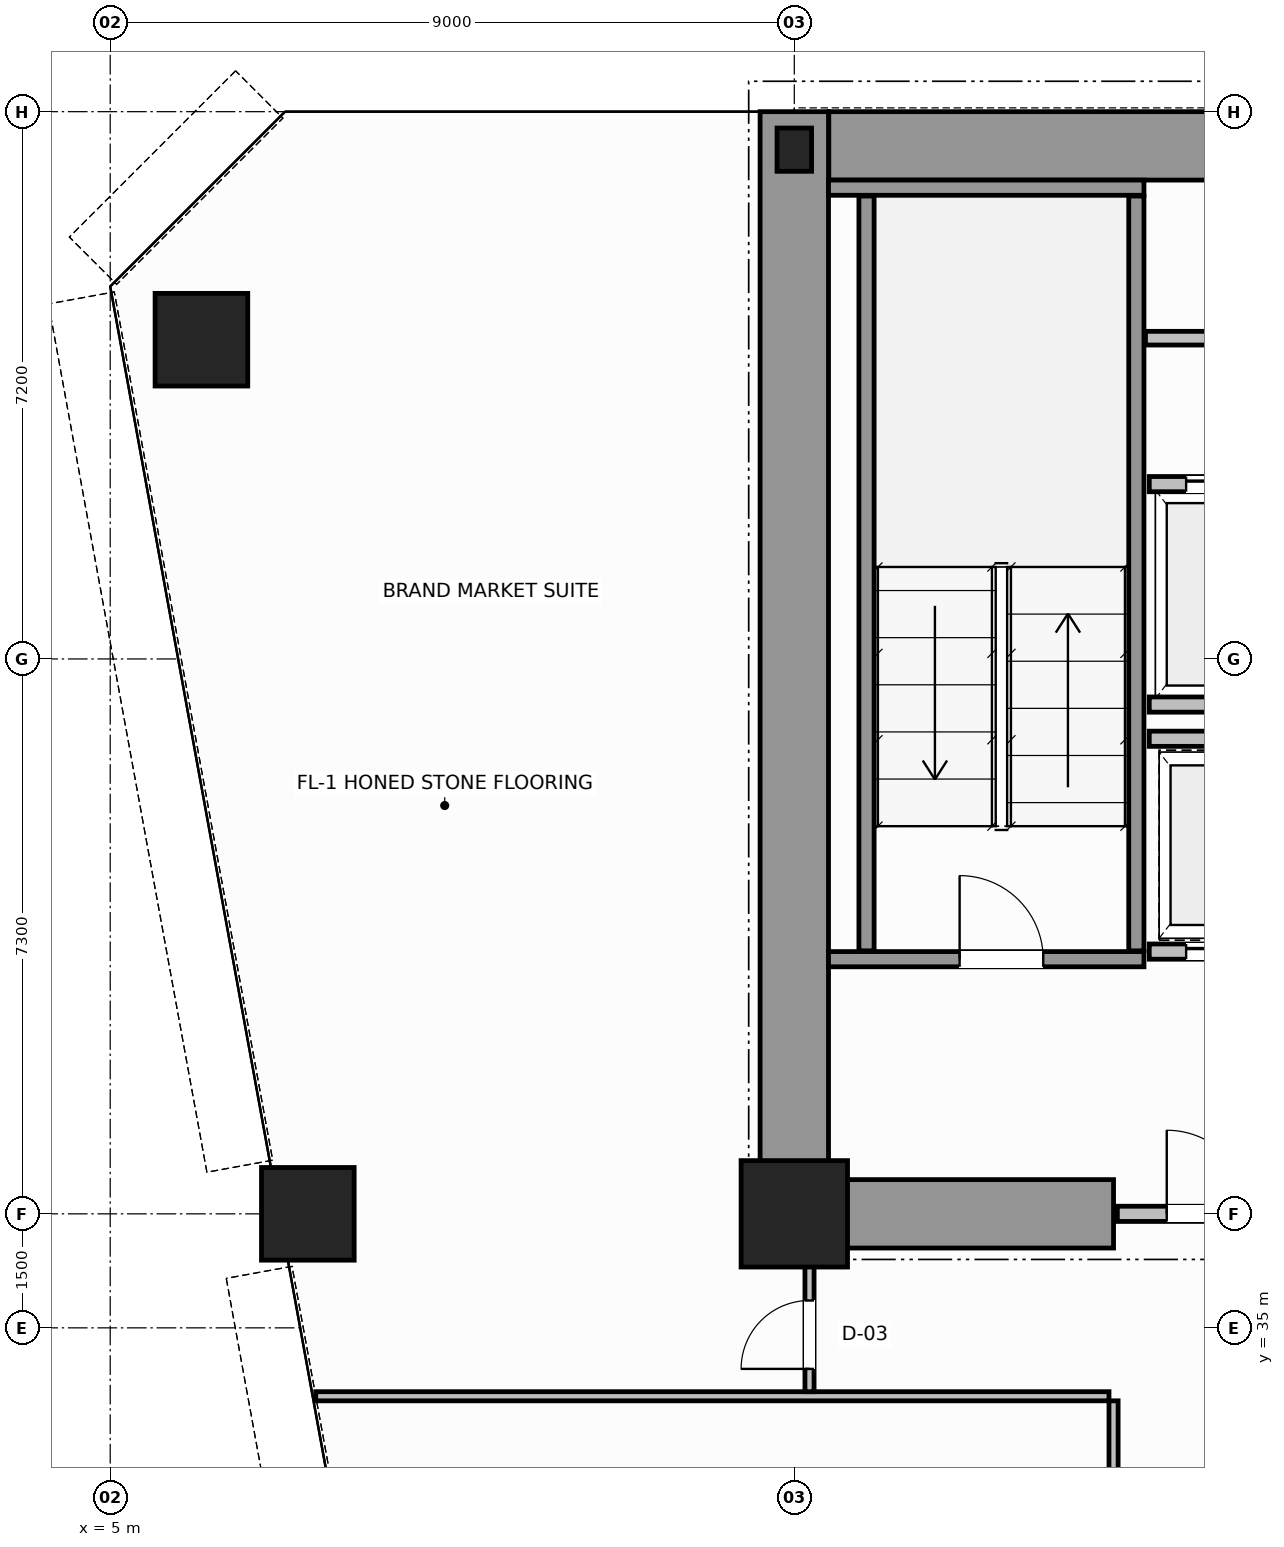
"""IFC4 building model, lengths in metres.
Left out: names, types, materials, properties, quantities, classifications, styles, units other than length and angle.
Written with IfcOpenShell. Run it as: python <this file> out.ifc"""

import sys

from ifc_helpers import new_model, si_unit, direction, frame, frame_2d, origin, origin_2d, place, context, subcontext, project, spatial, rectangle, hollow_circle, i_section, extrude, source, transform, mapped, element, fill, save


model = new_model("IFC4")
c1 = context("Model", 3, precision=1e-05, world=origin(), true_north=direction((0.0, 1.0)))
c2 = subcontext(c1, "Body", "Model", "MODEL_VIEW")
j1 = project(units=[si_unit("LENGTHUNIT", "METRE"), si_unit("PLANEANGLEUNIT", "RADIAN")], contexts=[c1])
p1 = place(None, origin())
s1 = spatial("IfcSite", under=j1, at=p1, CompositionType="ELEMENT")
p2 = place(p1, origin())
s2 = spatial("IfcBuilding", under=s1, at=p2, CompositionType="ELEMENT")
p3 = place(p2, frame((0.0, 0.0, 64.4)))
s3 = spatial("IfcBuildingStorey", under=s2, at=p3, CompositionType="ELEMENT", Elevation=64.4)
m1 = source(origin(), c2, "Body", "SweptSolid", [
    extrude(rectangle(XDim=1.4, YDim=1.4, at=origin_2d()), origin(), (0.0, 0.0, 1.0), 3.8),
])
p4 = place(p3, frame((14.0, 36.5, 0.0), z_axis=(0.0, 0.0, 1.0), x_axis=(1.0, 0.0, 0.0)))
e1 = element("IfcColumn", 1, at=p4, inside=s3, PredefinedType="COLUMN", context=c2, shape_type="MappedRepresentation", body=[
    mapped(m1, transform((0.0, 0.0, 0.0), scale=1.0)),
])
m2 = source(origin(), c2, "Body", "SweptSolid", [
    extrude(i_section(OverallWidth=0.454, OverallDepth=0.569, WebThickness=0.078, FlangeThickness=0.08, FilletRadius=0.015, at=origin_2d()), origin(), (0.0, 0.0, 1.0), 3.8),
])
p5 = place(p3, frame((14.0, 50.5, 0.0), z_axis=(0.0, 0.0, 1.0), x_axis=(1.0, 0.0, 0.0)))
e2 = element("IfcColumn", 2, at=p5, inside=s3, PredefinedType="COLUMN", context=c2, shape_type="MappedRepresentation", body=[
    mapped(m2, transform((0.0, 0.0, 0.0), scale=1.0)),
])
m3 = source(origin(), c2, "Body", "SweptSolid", [
    extrude(hollow_circle(Radius=0.61, WallThickness=0.05, at=origin_2d()), origin(), (0.0, 0.0, 1.0), 3.8),
])
for number, where, z_axis, x_axis in (
    (3, (6.2, 48.0, 0.0), (0.0, 0.0, 1.0), (1.0, 0.0, 0.0)),
    (4, (7.6, 36.5, 0.0), (0.0, 0.0, 1.0), (1.0, 0.0, 0.0)),
):
    element("IfcColumn", number, at=place(p3, frame(where, z_axis=z_axis, x_axis=x_axis)), inside=s3, PredefinedType="COLUMN", context=c2, shape_type="MappedRepresentation", body=[
        mapped(m3, transform((0.0, 0.0, 0.0), scale=1.0)),
    ])
p6 = place(p3, frame((14.454, 50.55, 0.0), z_axis=(0.0, 0.0, 1.0), x_axis=(1.0, 0.0, 0.0)))
e5 = element("IfcWall", 5, at=p6, inside=s3, PredefinedType="SHEAR", context=c2, shape_type="SweptSolid", body=[
    extrude(rectangle(XDim=19.544, YDim=0.9, at=frame_2d((9.772, 0.0))), origin(), (0.0, 0.0, 1.0), 3.8),
])
p7 = place(p3, frame((14.0, 36.5, 0.0), z_axis=(0.0, 0.0, 1.0), x_axis=(0.0, 1.0, 0.0)))
e6 = element("IfcWall", 6, at=p7, inside=s3, PredefinedType="SHEAR", context=c2, shape_type="SweptSolid", body=[
    extrude(rectangle(XDim=14.5, YDim=0.9, at=frame_2d((7.25, 0.0))), origin(), (0.0, 0.0, 1.0), 3.8),
])
p8 = place(p3, frame((14.47, 36.5, 0.0), z_axis=(0.0, 0.0, 1.0), x_axis=(1.0, 0.0, 0.0)))
e7 = element("IfcWall", 7, at=p8, inside=s3, PredefinedType="SHEAR", context=c2, shape_type="SweptSolid", body=[
    extrude(rectangle(XDim=3.73, YDim=0.9, at=frame_2d((1.865, 0.0))), origin(), (0.0, 0.0, 1.0), 2.38),
])
p9 = place(p3, frame((14.45, 39.85, 0.0), z_axis=(0.0, 0.0, 1.0), x_axis=(1.0, 0.0, 0.0)))
e8 = element("IfcWall", 8, at=p9, inside=s3, PredefinedType="SOLIDWALL", context=c2, shape_type="SweptSolid", body=[
    extrude(rectangle(XDim=4.15, YDim=0.2, at=frame_2d((2.075, 0.0))), origin(), (0.0, 0.0, 1.0), 3.8),
])
p10 = place(p9, frame((1.725, 0.0, 0.0)))
e9 = element("IfcOpeningElement", 9, at=p10, cuts=e8, PredefinedType="OPENING", context=c2, shape_type="SweptSolid", body=[
    extrude(rectangle(XDim=1.1, YDim=2.15, at=frame_2d((0.55, 1.075))), frame((0.0, 0.11, 0.0), z_axis=(0.0, -1.0, 0.0), x_axis=(1.0, 0.0, 0.0)), (0.0, 0.0, 1.0), 0.22),
])
p11 = place(p3, frame((14.45, 50.0, 0.0), z_axis=(0.0, 0.0, 1.0), x_axis=(1.0, 0.0, 0.0)))
e10 = element("IfcWall", 10, at=p11, inside=s3, PredefinedType="SOLIDWALL", context=c2, shape_type="SweptSolid", body=[
    extrude(rectangle(XDim=4.15, YDim=0.2, at=frame_2d((2.075, 0.0))), origin(), (0.0, 0.0, 1.0), 3.8),
])
for number, where, z_axis, x_axis in (
    (11, (14.95, 39.96, 0.0), (0.0, 0.0, 1.0), (0.0, 1.0, 0.0)),
    (12, (18.5, 39.96, 0.0), (0.0, 0.0, 1.0), (0.0, 1.0, 0.0)),
):
    element("IfcWall", number, at=place(p3, frame(where, z_axis=z_axis, x_axis=x_axis)), inside=s3, PredefinedType="SOLIDWALL", context=c2, shape_type="SweptSolid", body=[
        extrude(rectangle(XDim=9.93, YDim=0.2, at=frame_2d((4.965, 0.0))), origin(), (0.0, 0.0, 1.0), 3.8),
    ])
p12 = place(p3, frame((18.25, 36.5, 0.0), z_axis=(0.0, 0.0, 1.0), x_axis=(1.0, 0.0, 0.0)))
e13 = element("IfcWall", 13, at=p12, inside=s3, PredefinedType="SOLIDWALL", context=c2, shape_type="SweptSolid", body=[
    extrude(rectangle(XDim=2.47, YDim=0.2, at=frame_2d((1.235, 0.0))), origin(), (0.0, 0.0, 1.0), 2.37),
])
p13 = place(p12, frame((0.65, 0.0, 0.0)))
e14 = element("IfcOpeningElement", 14, at=p13, cuts=e13, PredefinedType="OPENING", context=c2, shape_type="SweptSolid", body=[
    extrude(rectangle(XDim=1.1, YDim=2.15, at=frame_2d((0.55, 1.075))), frame((0.0, 0.11, 0.0), z_axis=(0.0, -1.0, 0.0), x_axis=(1.0, 0.0, 0.0)), (0.0, 0.0, 1.0), 0.22),
])
p14 = place(p3, frame((18.67, 46.1, 0.0), z_axis=(0.0, 0.0, 1.0), x_axis=(1.0, 0.0, 0.0)))
e15 = element("IfcWall", 15, at=p14, inside=s3, PredefinedType="SOLIDWALL", context=c2, shape_type="SweptSolid", body=[
    extrude(rectangle(XDim=2.07, YDim=0.2, at=frame_2d((1.035, 0.0))), origin(), (0.0, 0.0, 1.0), 3.58),
])
p15 = place(p14, frame((0.485, 0.0, 0.0)))
e16 = element("IfcOpeningElement", 16, at=p15, cuts=e15, PredefinedType="OPENING", context=c2, shape_type="SweptSolid", body=[
    extrude(rectangle(XDim=1.1, YDim=2.15, at=frame_2d((0.55, 1.075))), frame((0.0, 0.11, 0.0), z_axis=(0.0, -1.0, 0.0), x_axis=(1.0, 0.0, 0.0)), (0.0, 0.0, 1.0), 0.22),
])
p16 = place(p3, frame((18.67, 43.2, 0.0), z_axis=(0.0, 0.0, 1.0), x_axis=(1.0, 0.0, 0.0)))
e17 = element("IfcWall", 17, at=p16, inside=s3, PredefinedType="SOLIDWALL", context=c2, shape_type="SweptSolid", body=[
    extrude(rectangle(XDim=2.07, YDim=0.2, at=frame_2d((1.035, 0.0))), origin(), (0.0, 0.0, 1.0), 3.58),
])
p17 = place(p3, frame((18.67, 39.95, 0.0), z_axis=(0.0, 0.0, 1.0), x_axis=(1.0, 0.0, 0.0)))
e18 = element("IfcWall", 18, at=p17, inside=s3, PredefinedType="SOLIDWALL", context=c2, shape_type="SweptSolid", body=[
    extrude(rectangle(XDim=2.07, YDim=0.2, at=frame_2d((1.035, 0.0))), origin(), (0.0, 0.0, 1.0), 3.58),
])
p18 = place(p17, frame((0.485, 0.0, 0.0)))
e19 = element("IfcOpeningElement", 19, at=p18, cuts=e18, PredefinedType="OPENING", context=c2, shape_type="SweptSolid", body=[
    extrude(rectangle(XDim=1.1, YDim=2.15, at=frame_2d((0.55, 1.075))), frame((0.0, 0.11, 0.0), z_axis=(0.0, -1.0, 0.0), x_axis=(1.0, 0.0, 0.0)), (0.0, 0.0, 1.0), 0.22),
])
p19 = place(p3, frame((18.67, 42.75, 0.0), z_axis=(0.0, 0.0, 1.0), x_axis=(1.0, 0.0, 0.0)))
e20 = element("IfcWall", 20, at=p19, inside=s3, PredefinedType="SOLIDWALL", context=c2, shape_type="SweptSolid", body=[
    extrude(rectangle(XDim=2.07, YDim=0.2, at=frame_2d((1.035, 0.0))), origin(), (0.0, 0.0, 1.0), 3.58),
])
p20 = place(p3, frame((18.62, 48.02, 0.0), z_axis=(0.0, 0.0, 1.0), x_axis=(1.0, 0.0, 0.0)))
e21 = element("IfcWall", 21, at=p20, inside=s3, PredefinedType="PLUMBINGWALL", context=c2, shape_type="SweptSolid", body=[
    extrude(rectangle(XDim=30.76, YDim=0.18, at=frame_2d((15.38, 0.0))), origin(), (0.0, 0.0, 1.0), 3.58),
])
p21 = place(p20, frame((1.655, 0.0, 0.0)))
e22 = element("IfcOpeningElement", 22, at=p21, cuts=e21, PredefinedType="OPENING", context=c2, shape_type="SweptSolid", body=[
    extrude(rectangle(XDim=0.9, YDim=2.15, at=frame_2d((0.45, 1.075))), frame((0.0, 0.1, 0.0), z_axis=(0.0, -1.0, 0.0), x_axis=(1.0, 0.0, 0.0)), (0.0, 0.0, 1.0), 0.2),
])
p22 = place(p20, frame((6.03, 0.0, 0.0)))
e23 = element("IfcOpeningElement", 23, at=p22, cuts=e21, PredefinedType="OPENING", context=c2, shape_type="SweptSolid", body=[
    extrude(rectangle(XDim=0.9, YDim=2.15, at=frame_2d((0.45, 1.075))), frame((0.0, 0.1, 0.0), z_axis=(0.0, -1.0, 0.0), x_axis=(1.0, 0.0, 0.0)), (0.0, 0.0, 1.0), 0.2),
])
p23 = place(p20, frame((10.93, 0.0, 0.0)))
e24 = element("IfcOpeningElement", 24, at=p23, cuts=e21, PredefinedType="OPENING", context=c2, shape_type="SweptSolid", body=[
    extrude(rectangle(XDim=0.9, YDim=2.15, at=frame_2d((0.45, 1.075))), frame((0.0, 0.1, 0.0), z_axis=(0.0, -1.0, 0.0), x_axis=(1.0, 0.0, 0.0)), (0.0, 0.0, 1.0), 0.2),
])
p24 = place(p20, frame((16.13, 0.0, 0.0)))
e25 = element("IfcOpeningElement", 25, at=p24, cuts=e21, PredefinedType="OPENING", context=c2, shape_type="SweptSolid", body=[
    extrude(rectangle(XDim=0.9, YDim=2.15, at=frame_2d((0.45, 1.075))), frame((0.0, 0.1, 0.0), z_axis=(0.0, -1.0, 0.0), x_axis=(1.0, 0.0, 0.0)), (0.0, 0.0, 1.0), 0.2),
])
p25 = place(p20, frame((21.73, 0.0, 0.0)))
e26 = element("IfcOpeningElement", 26, at=p25, cuts=e21, PredefinedType="OPENING", context=c2, shape_type="SweptSolid", body=[
    extrude(rectangle(XDim=0.9, YDim=2.15, at=frame_2d((0.45, 1.075))), frame((0.0, 0.1, 0.0), z_axis=(0.0, -1.0, 0.0), x_axis=(1.0, 0.0, 0.0)), (0.0, 0.0, 1.0), 0.2),
])
p26 = place(p20, frame((27.505, 0.0, 0.0)))
e27 = element("IfcOpeningElement", 27, at=p26, cuts=e21, PredefinedType="OPENING", context=c2, shape_type="SweptSolid", body=[
    extrude(rectangle(XDim=0.9, YDim=2.15, at=frame_2d((0.45, 1.075))), frame((0.0, 0.1, 0.0), z_axis=(0.0, -1.0, 0.0), x_axis=(1.0, 0.0, 0.0)), (0.0, 0.0, 1.0), 0.2),
])
p27 = place(p3, frame((7.704, 34.1, 0.0), z_axis=(0.0, 0.0, 1.0), x_axis=(1.0, 0.0, 0.0)))
e28 = element("IfcWall", 28, at=p27, inside=s3, PredefinedType="PARTITIONING", context=c2, shape_type="SweptSolid", body=[
    extrude(rectangle(XDim=10.436, YDim=0.12, at=frame_2d((5.218, 0.0))), origin(), (0.0, 0.0, 1.0), 3.58),
])
p28 = place(p3, frame((14.2, 34.16, 0.0), z_axis=(0.0, 0.0, 1.0), x_axis=(0.0, 1.0, 0.0)))
e29 = element("IfcWall", 29, at=p28, inside=s3, PredefinedType="PARTITIONING", context=c2, shape_type="SweptSolid", body=[
    extrude(rectangle(XDim=2.28, YDim=0.12, at=frame_2d((1.14, 0.0))), origin(), (0.0, 0.0, 1.0), 3.58),
])
p29 = place(p28, frame((0.3, 0.0, 0.0)))
e30 = element("IfcOpeningElement", 30, at=p29, cuts=e29, PredefinedType="OPENING", context=c2, shape_type="SweptSolid", body=[
    extrude(rectangle(XDim=0.9, YDim=2.15, at=frame_2d((0.45, 1.075))), frame((0.0, 0.07, 0.0), z_axis=(0.0, -1.0, 0.0), x_axis=(1.0, 0.0, 0.0)), (0.0, 0.0, 1.0), 0.14),
])
p30 = place(p3, frame((18.2, 19.6, 0.0), z_axis=(0.0, 0.0, 1.0), x_axis=(0.0, 1.0, 0.0)))
e31 = element("IfcWall", 31, at=p30, inside=s3, PredefinedType="PARTITIONING", context=c2, shape_type="SweptSolid", body=[
    extrude(rectangle(XDim=14.44, YDim=0.12, at=frame_2d((7.22, 0.0))), origin(), (0.0, 0.0, 1.0), 3.58),
])
p31 = place(p30, frame((3.65, 0.0, 0.0)))
e32 = element("IfcOpeningElement", 32, at=p31, cuts=e31, PredefinedType="OPENING", context=c2, shape_type="SweptSolid", body=[
    extrude(rectangle(XDim=0.9, YDim=2.15, at=frame_2d((0.45, 1.075))), frame((0.0, 0.07, 0.0), z_axis=(0.0, -1.0, 0.0), x_axis=(1.0, 0.0, 0.0)), (0.0, 0.0, 1.0), 0.14),
])
p32 = place(p30, frame((10.87, 0.0, 0.0)))
e33 = element("IfcOpeningElement", 33, at=p32, cuts=e31, PredefinedType="OPENING", context=c2, shape_type="SweptSolid", body=[
    extrude(rectangle(XDim=0.9, YDim=2.15, at=frame_2d((0.45, 1.075))), frame((0.0, 0.07, 0.0), z_axis=(0.0, -1.0, 0.0), x_axis=(1.0, 0.0, 0.0)), (0.0, 0.0, 1.0), 0.14),
])
m4 = source(origin(), c2, "Body", "SweptSolid", [
    extrude(rectangle(XDim=1.1, YDim=2.15, at=frame_2d((0.55, 1.075))), frame((0.0, 0.025, 0.0), z_axis=(0.0, -1.0, 0.0), x_axis=(1.0, 0.0, 0.0)), (0.0, 0.0, 1.0), 0.05),
])
p33 = place(p10, origin())
e34 = element("IfcDoor", 34, at=p33, inside=s3, OperationType="SINGLE_SWING_LEFT", PredefinedType="DOOR", context=c2, shape_type="MappedRepresentation", body=[
    mapped(m4, transform((0.0, 0.0, 0.0), scale=1.0)),
])
fill(e9, e34)
p34 = place(p13, origin())
e35 = element("IfcDoor", 35, at=p34, inside=s3, OperationType="SINGLE_SWING_RIGHT", PredefinedType="DOOR", context=c2, shape_type="MappedRepresentation", body=[
    mapped(m4, transform((0.0, 0.0, 0.0), scale=1.0)),
])
fill(e14, e35)
p35 = place(p15, origin())
e36 = element("IfcDoor", 36, at=p35, inside=s3, OperationType="DOUBLE_DOOR_SLIDING", PredefinedType="DOOR", context=c2, shape_type="MappedRepresentation", body=[
    mapped(m4, transform((0.0, 0.0, 0.0), scale=1.0)),
])
fill(e16, e36)
p36 = place(p18, origin())
e37 = element("IfcDoor", 37, at=p36, inside=s3, OperationType="DOUBLE_DOOR_SLIDING", PredefinedType="DOOR", context=c2, shape_type="MappedRepresentation", body=[
    mapped(m4, transform((0.0, 0.0, 0.0), scale=1.0)),
])
fill(e19, e37)
m5 = source(origin(), c2, "Body", "SweptSolid", [
    extrude(rectangle(XDim=0.9, YDim=2.15, at=frame_2d((0.45, 1.075))), frame((0.0, 0.025, 0.0), z_axis=(0.0, -1.0, 0.0), x_axis=(1.0, 0.0, 0.0)), (0.0, 0.0, 1.0), 0.05),
])
p37 = place(p29, origin())
e38 = element("IfcDoor", 38, at=p37, inside=s3, OperationType="SINGLE_SWING_LEFT", PredefinedType="DOOR", context=c2, shape_type="MappedRepresentation", body=[
    mapped(m5, transform((0.0, 0.0, 0.0), scale=1.0)),
])
fill(e30, e38)
save(model, sys.argv[1])
